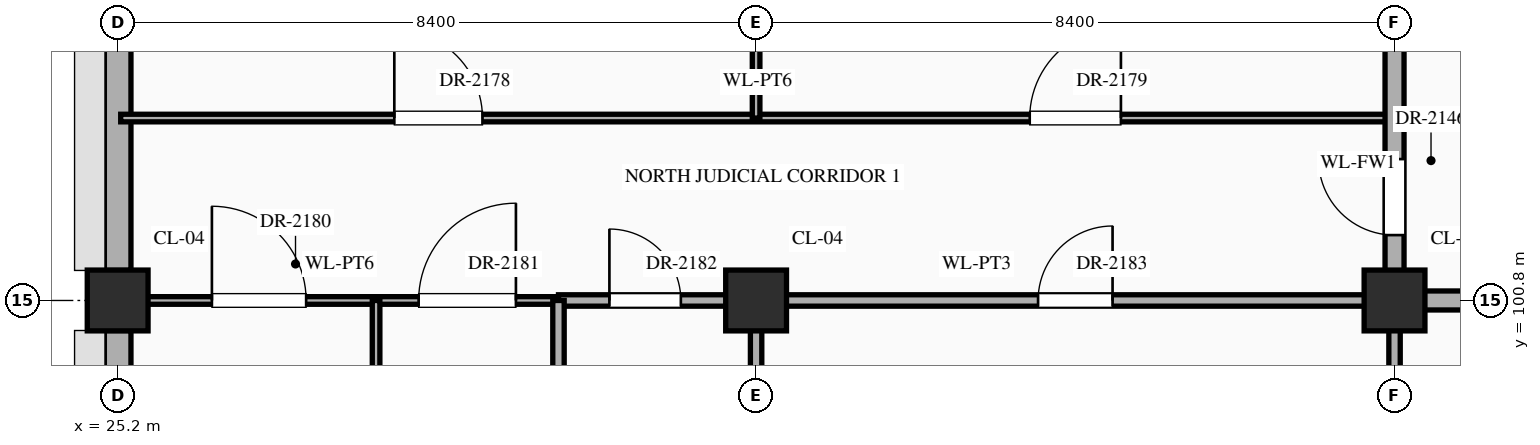
"""IFC4 building model, lengths in metres.
Left out: names, types, materials, properties, quantities, classifications, styles, units other than length and angle.
Written with IfcOpenShell. Run it as: python <this file> out.ifc"""

import sys

from ifc_helpers import new_model, si_unit, direction, frame, frame_2d, origin, origin_2d, place, context, subcontext, project, spatial, rectangle, extrude, element, fill, save


model = new_model("IFC4")
c1 = context("Model", 3, precision=1e-05, world=origin(), true_north=direction((0.0, 1.0)))
c2 = subcontext(c1, "Body", "Model", "MODEL_VIEW")
j1 = project(units=[si_unit("LENGTHUNIT", "METRE"), si_unit("PLANEANGLEUNIT", "RADIAN")], contexts=[c1])
p1 = place(None, origin())
s1 = spatial("IfcSite", under=j1, at=p1, CompositionType="ELEMENT")
p2 = place(p1, origin())
s2 = spatial("IfcBuilding", under=s1, at=p2, CompositionType="ELEMENT")
p3 = place(p2, frame((0.0, 0.0, 26.1)))
s3 = spatial("IfcBuildingStorey", under=s2, at=p3, CompositionType="ELEMENT", Elevation=26.1)
for number, where, z_axis, x_axis in (
    (1, (25.2, 100.8, 0.0), (0.0, 0.0, 1.0), (1.0, 0.0, 0.0)),
    (2, (33.6, 100.8, 0.0), (0.0, 0.0, 1.0), (1.0, 0.0, 0.0)),
    (3, (42.0, 100.8, 0.0), (0.0, 0.0, 1.0), (1.0, 0.0, 0.0)),
):
    element("IfcColumn", number, at=place(p3, frame(where, z_axis=z_axis, x_axis=x_axis)), inside=s3, PredefinedType="COLUMN", context=c2, shape_type="SweptSolid", body=[
        extrude(rectangle(XDim=0.8, YDim=0.8, at=origin_2d()), origin(), (0.0, 0.0, 1.0), 4.5),
    ])
p4 = place(p3, frame((25.2, 93.995, 0.0), z_axis=(0.0, 0.0, 1.0), x_axis=(0.0, 1.0, 0.0)))
e4 = element("IfcWall", 4, at=p4, inside=s3, PredefinedType="STANDARD", context=c2, shape_type="SweptSolid", body=[
    extrude(rectangle(XDim=6.41, YDim=0.35, at=frame_2d((3.205, 0.0))), origin(), (0.0, 0.0, 1.0), 3.59),
])
p5 = place(p4, frame((3.83, 0.0, 0.85)))
e5 = element("IfcOpeningElement", 5, at=p5, cuts=e4, PredefinedType="OPENING", context=c2, shape_type="SweptSolid", body=[
    extrude(rectangle(XDim=1.35, YDim=1.56, at=frame_2d((0.675, 0.78))), frame((0.0, 0.187, 0.0), z_axis=(0.0, -1.0, 0.0), x_axis=(1.0, 0.0, 0.0)), (0.0, 0.0, 1.0), 0.374),
])
p6 = place(p3, frame((25.2, 101.195, 0.0), z_axis=(0.0, 0.0, 1.0), x_axis=(0.0, 1.0, 0.0)))
e6 = element("IfcWall", 6, at=p6, inside=s3, PredefinedType="STANDARD", context=c2, shape_type="SweptSolid", body=[
    extrude(rectangle(XDim=6.41, YDim=0.35, at=frame_2d((3.205, 0.0))), origin(), (0.0, 0.0, 1.0), 3.59),
])
p7 = place(p6, frame((3.83, 0.0, 0.85)))
e7 = element("IfcOpeningElement", 7, at=p7, cuts=e6, PredefinedType="OPENING", context=c2, shape_type="SweptSolid", body=[
    extrude(rectangle(XDim=1.35, YDim=1.74, at=frame_2d((0.675, 0.87))), frame((0.0, 0.187, 0.0), z_axis=(0.0, -1.0, 0.0), x_axis=(1.0, 0.0, 0.0)), (0.0, 0.0, 1.0), 0.374),
])
p8 = place(p3, frame((25.24, 100.8, 0.0), z_axis=(0.0, 0.0, 1.0), x_axis=(1.0, 0.0, 0.0)))
e8 = element("IfcWall", 8, at=p8, inside=s3, PredefinedType="STANDARD", context=c2, shape_type="SweptSolid", body=[
    extrude(rectangle(XDim=5.76, YDim=0.1, at=frame_2d((2.88, 0.0))), origin(), (0.0, 0.0, 1.0), 3.39),
])
p9 = place(p8, frame((1.2, 0.0, 0.0)))
e9 = element("IfcOpeningElement", 9, at=p9, cuts=e8, PredefinedType="OPENING", context=c2, shape_type="SweptSolid", body=[
    extrude(rectangle(XDim=1.24, YDim=2.3, at=frame_2d((0.62, 1.15))), frame((0.0, 0.062, 0.0), z_axis=(0.0, -1.0, 0.0), x_axis=(1.0, 0.0, 0.0)), (0.0, 0.0, 1.0), 0.124),
])
p10 = place(p8, frame((3.92, 0.0, 0.0)))
e10 = element("IfcOpeningElement", 10, at=p10, cuts=e8, PredefinedType="OPENING", context=c2, shape_type="SweptSolid", body=[
    extrude(rectangle(XDim=1.28, YDim=2.35, at=frame_2d((0.64, 1.175))), frame((0.0, 0.062, 0.0), z_axis=(0.0, -1.0, 0.0), x_axis=(1.0, 0.0, 0.0)), (0.0, 0.0, 1.0), 0.124),
])
p11 = place(p3, frame((31.0, 100.8, 0.0), z_axis=(0.0, 0.0, 1.0), x_axis=(1.0, 0.0, 0.0)))
e11 = element("IfcWall", 11, at=p11, inside=s3, PredefinedType="STANDARD", context=c2, shape_type="SweptSolid", body=[
    extrude(rectangle(XDim=11.0, YDim=0.15, at=frame_2d((5.5, 0.0))), origin(), (0.0, 0.0, 1.0), 3.39),
])
p12 = place(p11, frame((0.67, 0.0, 0.0)))
e12 = element("IfcOpeningElement", 12, at=p12, cuts=e11, PredefinedType="OPENING", context=c2, shape_type="SweptSolid", body=[
    extrude(rectangle(XDim=0.94, YDim=2.3, at=frame_2d((0.47, 1.15))), frame((0.0, 0.087, 0.0), z_axis=(0.0, -1.0, 0.0), x_axis=(1.0, 0.0, 0.0)), (0.0, 0.0, 1.0), 0.174),
])
p13 = place(p11, frame((6.31, 0.0, 0.0)))
e13 = element("IfcOpeningElement", 13, at=p13, cuts=e11, PredefinedType="OPENING", context=c2, shape_type="SweptSolid", body=[
    extrude(rectangle(XDim=0.98, YDim=2.35, at=frame_2d((0.49, 1.175))), frame((0.0, 0.087, 0.0), z_axis=(0.0, -1.0, 0.0), x_axis=(1.0, 0.0, 0.0)), (0.0, 0.0, 1.0), 0.174),
])
p14 = place(p3, frame((42.0, 100.8, 0.0), z_axis=(0.0, 0.0, 1.0), x_axis=(1.0, 0.0, 0.0)))
e14 = element("IfcWall", 14, at=p14, inside=s3, PredefinedType="STANDARD", context=c2, shape_type="SweptSolid", body=[
    extrude(rectangle(XDim=4.2, YDim=0.25, at=frame_2d((2.1, 0.0))), origin(), (0.0, 0.0, 1.0), 3.39),
])
p15 = place(p3, frame((25.24, 103.2, 0.0), z_axis=(0.0, 0.0, 1.0), x_axis=(1.0, 0.0, 0.0)))
e15 = element("IfcWall", 15, at=p15, inside=s3, PredefinedType="STANDARD", context=c2, shape_type="SweptSolid", body=[
    extrude(rectangle(XDim=16.76, YDim=0.1, at=frame_2d((8.38, 0.0))), origin(), (0.0, 0.0, 1.0), 4.24),
])
p16 = place(p15, frame((3.6, 0.0, 0.0)))
e16 = element("IfcOpeningElement", 16, at=p16, cuts=e15, PredefinedType="OPENING", context=c2, shape_type="SweptSolid", body=[
    extrude(rectangle(XDim=1.16, YDim=2.3, at=frame_2d((0.58, 1.15))), frame((0.0, 0.062, 0.0), z_axis=(0.0, -1.0, 0.0), x_axis=(1.0, 0.0, 0.0)), (0.0, 0.0, 1.0), 0.124),
])
p17 = place(p15, frame((11.96, 0.0, 0.0)))
e17 = element("IfcOpeningElement", 17, at=p17, cuts=e15, PredefinedType="OPENING", context=c2, shape_type="SweptSolid", body=[
    extrude(rectangle(XDim=1.2, YDim=2.35, at=frame_2d((0.6, 1.175))), frame((0.0, 0.062, 0.0), z_axis=(0.0, -1.0, 0.0), x_axis=(1.0, 0.0, 0.0)), (0.0, 0.0, 1.0), 0.124),
])
p18 = place(p3, frame((28.6, 96.0, 0.0), z_axis=(0.0, 0.0, 1.0), x_axis=(0.0, 1.0, 0.0)))
e18 = element("IfcWall", 18, at=p18, inside=s3, PredefinedType="STANDARD", context=c2, shape_type="SweptSolid", body=[
    extrude(rectangle(XDim=4.8, YDim=0.1, at=frame_2d((2.4, 0.0))), origin(), (0.0, 0.0, 1.0), 4.24),
])
p19 = place(p18, frame((1.97, 0.0, 0.0)))
e19 = element("IfcOpeningElement", 19, at=p19, cuts=e18, PredefinedType="OPENING", context=c2, shape_type="SweptSolid", body=[
    extrude(rectangle(XDim=0.86, YDim=2.1, at=frame_2d((0.43, 1.05))), frame((0.0, 0.062, 0.0), z_axis=(0.0, -1.0, 0.0), x_axis=(1.0, 0.0, 0.0)), (0.0, 0.0, 1.0), 0.124),
])
p20 = place(p3, frame((31.0, 96.0, 0.0), z_axis=(0.0, 0.0, 1.0), x_axis=(0.0, 1.0, 0.0)))
e20 = element("IfcWall", 20, at=p20, inside=s3, PredefinedType="STANDARD", context=c2, shape_type="SweptSolid", body=[
    extrude(rectangle(XDim=4.8, YDim=0.15, at=frame_2d((2.4, 0.0))), origin(), (0.0, 0.0, 1.0), 4.24),
])
p21 = place(p20, frame((1.94, 0.0, 0.0)))
e21 = element("IfcOpeningElement", 21, at=p21, cuts=e20, PredefinedType="OPENING", context=c2, shape_type="SweptSolid", body=[
    extrude(rectangle(XDim=0.92, YDim=2.15, at=frame_2d((0.46, 1.075))), frame((0.0, 0.087, 0.0), z_axis=(0.0, -1.0, 0.0), x_axis=(1.0, 0.0, 0.0)), (0.0, 0.0, 1.0), 0.174),
])
p22 = place(p3, frame((33.6, 96.0, 0.0), z_axis=(0.0, 0.0, 1.0), x_axis=(0.0, 1.0, 0.0)))
e22 = element("IfcWall", 22, at=p22, inside=s3, PredefinedType="STANDARD", context=c2, shape_type="SweptSolid", body=[
    extrude(rectangle(XDim=4.8, YDim=0.15, at=frame_2d((2.4, 0.0))), origin(), (0.0, 0.0, 1.0), 4.24),
])
p23 = place(p3, frame((33.6, 103.2, 0.0), z_axis=(0.0, 0.0, 1.0), x_axis=(0.0, 1.0, 0.0)))
e23 = element("IfcWall", 23, at=p23, inside=s3, PredefinedType="STANDARD", context=c2, shape_type="SweptSolid", body=[
    extrude(rectangle(XDim=4.76, YDim=0.1, at=frame_2d((2.38, 0.0))), origin(), (0.0, 0.0, 1.0), 3.49),
])
p24 = place(p3, frame((42.0, 96.0, 0.0), z_axis=(0.0, 0.0, 1.0), x_axis=(0.0, 1.0, 0.0)))
e24 = element("IfcWall", 24, at=p24, inside=s3, PredefinedType="STANDARD", context=c2, shape_type="SweptSolid", body=[
    extrude(rectangle(XDim=4.8, YDim=0.15, at=frame_2d((2.4, 0.0))), origin(), (0.0, 0.0, 1.0), 3.49),
])
p25 = place(p3, frame((42.0, 100.8, 0.0), z_axis=(0.0, 0.0, 1.0), x_axis=(0.0, 1.0, 0.0)))
e25 = element("IfcWall", 25, at=p25, inside=s3, PredefinedType="STANDARD", context=c2, shape_type="SweptSolid", body=[
    extrude(rectangle(XDim=3.6, YDim=0.25, at=frame_2d((1.8, 0.0))), origin(), (0.0, 0.0, 1.0), 3.49),
])
p26 = place(p25, frame((0.86, 0.0, 0.0)))
e26 = element("IfcOpeningElement", 26, at=p26, cuts=e25, PredefinedType="OPENING", context=c2, shape_type="SweptSolid", body=[
    extrude(rectangle(XDim=1.0, YDim=2.2, at=frame_2d((0.5, 1.1))), frame((0.0, 0.137, 0.0), z_axis=(0.0, -1.0, 0.0), x_axis=(1.0, 0.0, 0.0)), (0.0, 0.0, 1.0), 0.274),
])
p27 = place(p26, origin())
e27 = element("IfcDoor", 27, at=p27, inside=s3, OperationType="SINGLE_SWING_RIGHT", PredefinedType="DOOR", context=c2, shape_type="SweptSolid", body=[
    extrude(rectangle(XDim=1.0, YDim=2.2, at=frame_2d((0.5, 1.1))), frame((0.0, 0.025, 0.0), z_axis=(0.0, -1.0, 0.0), x_axis=(1.0, 0.0, 0.0)), (0.0, 0.0, 1.0), 0.05),
])
fill(e26, e27)
p28 = place(p16, origin())
e28 = element("IfcDoor", 28, at=p28, inside=s3, OperationType="SINGLE_SWING_LEFT", PredefinedType="DOOR", context=c2, shape_type="SweptSolid", body=[
    extrude(rectangle(XDim=1.16, YDim=2.3, at=frame_2d((0.58, 1.15))), frame((0.0, 0.025, 0.0), z_axis=(0.0, -1.0, 0.0), x_axis=(1.0, 0.0, 0.0)), (0.0, 0.0, 1.0), 0.05),
])
fill(e16, e28)
p29 = place(p17, origin())
e29 = element("IfcDoor", 29, at=p29, inside=s3, OperationType="SINGLE_SWING_RIGHT", PredefinedType="DOOR", context=c2, shape_type="SweptSolid", body=[
    extrude(rectangle(XDim=1.2, YDim=2.35, at=frame_2d((0.6, 1.175))), frame((0.0, 0.025, 0.0), z_axis=(0.0, -1.0, 0.0), x_axis=(1.0, 0.0, 0.0)), (0.0, 0.0, 1.0), 0.05),
])
fill(e17, e29)
p30 = place(p9, origin())
e30 = element("IfcDoor", 30, at=p30, inside=s3, OperationType="SINGLE_SWING_LEFT", PredefinedType="DOOR", context=c2, shape_type="SweptSolid", body=[
    extrude(rectangle(XDim=1.24, YDim=2.3, at=frame_2d((0.62, 1.15))), frame((0.0, 0.025, 0.0), z_axis=(0.0, -1.0, 0.0), x_axis=(1.0, 0.0, 0.0)), (0.0, 0.0, 1.0), 0.05),
])
fill(e9, e30)
p31 = place(p10, origin())
e31 = element("IfcDoor", 31, at=p31, inside=s3, OperationType="SINGLE_SWING_RIGHT", PredefinedType="DOOR", context=c2, shape_type="SweptSolid", body=[
    extrude(rectangle(XDim=1.28, YDim=2.35, at=frame_2d((0.64, 1.175))), frame((0.0, 0.025, 0.0), z_axis=(0.0, -1.0, 0.0), x_axis=(1.0, 0.0, 0.0)), (0.0, 0.0, 1.0), 0.05),
])
fill(e10, e31)
p32 = place(p12, origin())
e32 = element("IfcDoor", 32, at=p32, inside=s3, OperationType="SINGLE_SWING_LEFT", PredefinedType="DOOR", context=c2, shape_type="SweptSolid", body=[
    extrude(rectangle(XDim=0.94, YDim=2.3, at=frame_2d((0.47, 1.15))), frame((0.0, 0.025, 0.0), z_axis=(0.0, -1.0, 0.0), x_axis=(1.0, 0.0, 0.0)), (0.0, 0.0, 1.0), 0.05),
])
fill(e12, e32)
p33 = place(p13, origin())
e33 = element("IfcDoor", 33, at=p33, inside=s3, OperationType="SINGLE_SWING_RIGHT", PredefinedType="DOOR", context=c2, shape_type="SweptSolid", body=[
    extrude(rectangle(XDim=0.98, YDim=2.35, at=frame_2d((0.49, 1.175))), frame((0.0, 0.025, 0.0), z_axis=(0.0, -1.0, 0.0), x_axis=(1.0, 0.0, 0.0)), (0.0, 0.0, 1.0), 0.05),
])
fill(e13, e33)
save(model, sys.argv[1])
